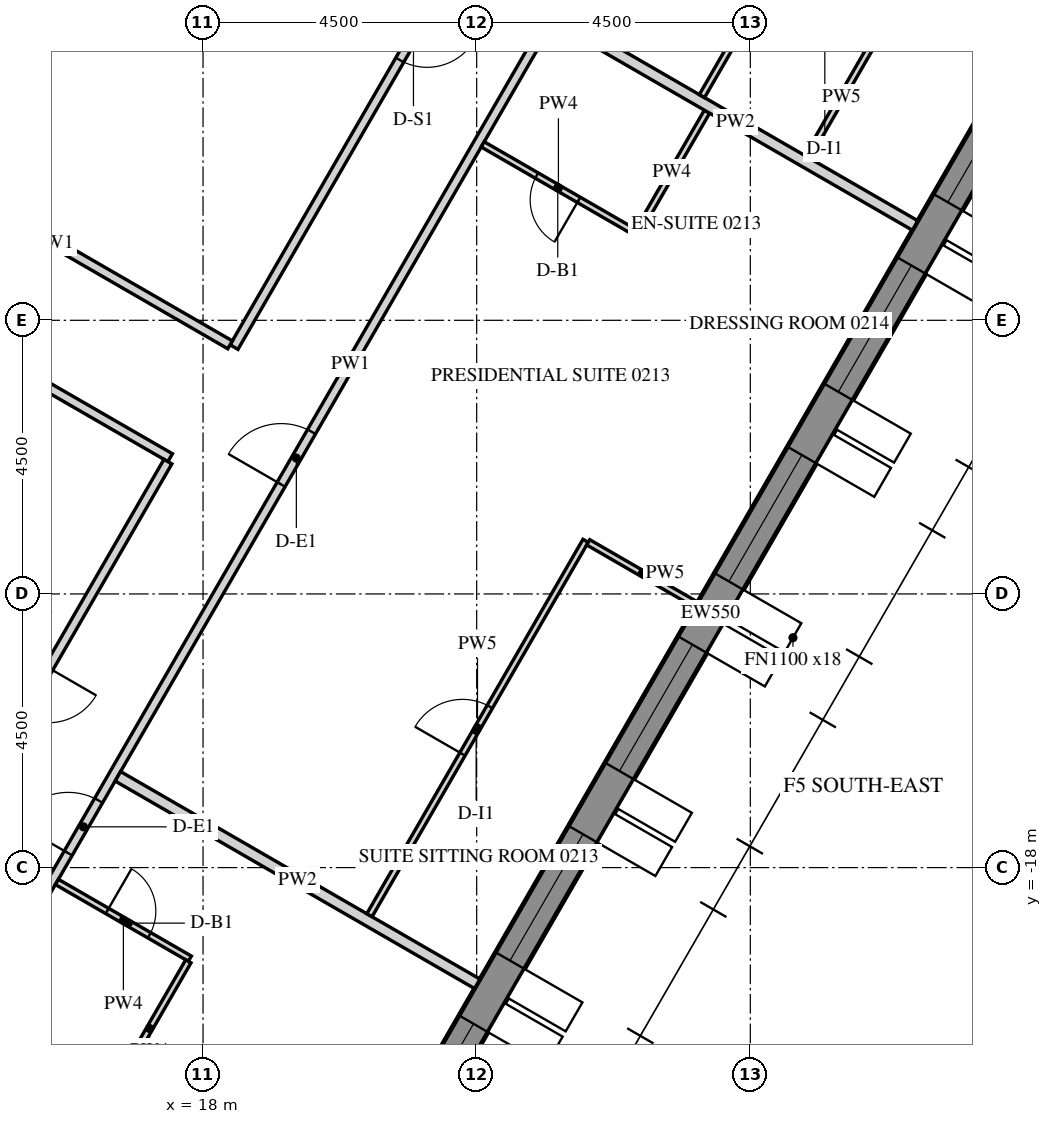
"""IFC4 building model, lengths in metres.
Left out: names, types, materials, properties, quantities, classifications, styles, units other than length and angle.
Written with IfcOpenShell. Run it as: python <this file> out.ifc"""

import sys

from ifc_helpers import new_model, si_unit, direction, frame, frame_2d, origin, place, context, subcontext, project, spatial, polyline, rectangle, outline, extrude, element, fill, save


model = new_model("IFC4")
c1 = context("Model", 3, precision=1e-05, world=origin(), true_north=direction((0.0, 1.0)))
c2 = subcontext(c1, "Body", "Model", "MODEL_VIEW")
j1 = project(units=[si_unit("LENGTHUNIT", "METRE"), si_unit("PLANEANGLEUNIT", "RADIAN")], contexts=[c1])
p1 = place(None, origin())
s1 = spatial("IfcSite", under=j1, at=p1, CompositionType="ELEMENT")
p2 = place(p1, origin())
s2 = spatial("IfcBuilding", under=s1, at=p2, CompositionType="ELEMENT")
p3 = place(p2, frame((0.0, 0.0, 49.2)))
s3 = spatial("IfcBuildingStorey", under=s2, at=p3, CompositionType="ELEMENT", Elevation=49.2)
p4 = place(p3, frame((18.83, -26.835, -0.15), z_axis=(0.0, 0.0, 1.0), x_axis=(0.500003800416, 0.866023209602, 0.0)))
e1 = element("IfcWall", 1, at=p4, inside=s3, PredefinedType="SOLIDWALL", context=c2, shape_type="SweptSolid", body=[
    extrude(outline(polyline([(-0.022, -0.275), (30.097, -0.275), (30.045, 0.275), (0.022, 0.275), (-0.022, -0.275)])), origin(), (0.0, 0.0, 1.0), 3.9),
])
p5 = place(p4, frame((1.236, 0.0, 1.05)))
e2 = element("IfcOpeningElement", 2, at=p5, cuts=e1, PredefinedType="OPENING", context=c2, shape_type="SweptSolid", body=[
    extrude(rectangle(XDim=2.4, YDim=2.4, at=frame_2d((1.2, 1.2))), frame((0.0, 0.285, 0.0), z_axis=(0.0, -1.0, 0.0), x_axis=(1.0, 0.0, 0.0)), (0.0, 0.0, 1.0), 0.57),
])
p6 = place(p4, frame((4.835, 0.0, 1.05)))
e3 = element("IfcOpeningElement", 3, at=p6, cuts=e1, PredefinedType="OPENING", context=c2, shape_type="SweptSolid", body=[
    extrude(rectangle(XDim=2.4, YDim=2.4, at=frame_2d((1.2, 1.2))), frame((0.0, 0.285, 0.0), z_axis=(0.0, -1.0, 0.0), x_axis=(1.0, 0.0, 0.0)), (0.0, 0.0, 1.0), 0.57),
])
p7 = place(p4, frame((8.436, 0.0, 1.05)))
e4 = element("IfcOpeningElement", 4, at=p7, cuts=e1, PredefinedType="OPENING", context=c2, shape_type="SweptSolid", body=[
    extrude(rectangle(XDim=2.4, YDim=2.4, at=frame_2d((1.2, 1.2))), frame((0.0, 0.285, 0.0), z_axis=(0.0, -1.0, 0.0), x_axis=(1.0, 0.0, 0.0)), (0.0, 0.0, 1.0), 0.57),
])
p8 = place(p4, frame((12.035, 0.0, 1.05)))
e5 = element("IfcOpeningElement", 5, at=p8, cuts=e1, PredefinedType="OPENING", context=c2, shape_type="SweptSolid", body=[
    extrude(rectangle(XDim=2.4, YDim=2.4, at=frame_2d((1.2, 1.2))), frame((0.0, 0.285, 0.0), z_axis=(0.0, -1.0, 0.0), x_axis=(1.0, 0.0, 0.0)), (0.0, 0.0, 1.0), 0.57),
])
p9 = place(p4, frame((15.635, 0.0, 1.05)))
e6 = element("IfcOpeningElement", 6, at=p9, cuts=e1, PredefinedType="OPENING", context=c2, shape_type="SweptSolid", body=[
    extrude(rectangle(XDim=2.4, YDim=2.4, at=frame_2d((1.2, 1.2))), frame((0.0, 0.285, 0.0), z_axis=(0.0, -1.0, 0.0), x_axis=(1.0, 0.0, 0.0)), (0.0, 0.0, 1.0), 0.57),
])
p10 = place(p4, frame((19.236, 0.0, 1.05)))
e7 = element("IfcOpeningElement", 7, at=p10, cuts=e1, PredefinedType="OPENING", context=c2, shape_type="SweptSolid", body=[
    extrude(rectangle(XDim=2.4, YDim=2.4, at=frame_2d((1.2, 1.2))), frame((0.0, 0.285, 0.0), z_axis=(0.0, -1.0, 0.0), x_axis=(1.0, 0.0, 0.0)), (0.0, 0.0, 1.0), 0.57),
])
p11 = place(p4, frame((22.835, 0.0, 1.05)))
e8 = element("IfcOpeningElement", 8, at=p11, cuts=e1, PredefinedType="OPENING", context=c2, shape_type="SweptSolid", body=[
    extrude(rectangle(XDim=2.4, YDim=2.4, at=frame_2d((1.2, 1.2))), frame((0.0, 0.285, 0.0), z_axis=(0.0, -1.0, 0.0), x_axis=(1.0, 0.0, 0.0)), (0.0, 0.0, 1.0), 0.57),
])
p12 = place(p4, frame((26.436, 0.0, 1.05)))
e9 = element("IfcOpeningElement", 9, at=p12, cuts=e1, PredefinedType="OPENING", context=c2, shape_type="SweptSolid", body=[
    extrude(rectangle(XDim=2.4, YDim=2.4, at=frame_2d((1.2, 1.2))), frame((0.0, 0.285, 0.0), z_axis=(0.0, -1.0, 0.0), x_axis=(1.0, 0.0, 0.0)), (0.0, 0.0, 1.0), 0.57),
])
p13 = place(p3, frame((7.91, -13.7, -0.15), z_axis=(0.0, 0.0, 1.0), x_axis=(0.499999880136, 0.866025472988, 0.0)))
e10 = element("IfcWall", 10, at=p13, inside=s3, PredefinedType="SHEAR", context=c2, shape_type="SweptSolid", body=[
    extrude(outline(polyline([(-0.173, -0.3), (15.993, -0.3), (15.646, 0.3), (0.173, 0.3), (-0.173, -0.3)])), origin(), (0.0, 0.0, 1.0), 3.9),
])
p14 = place(p13, frame((7.039, 0.0, 0.15)))
e11 = element("IfcOpeningElement", 11, at=p14, cuts=e10, PredefinedType="OPENING", context=c2, shape_type="SweptSolid", body=[
    extrude(rectangle(XDim=1.8, YDim=2.4, at=frame_2d((0.9, 1.2))), frame((0.0, 0.31, 0.0), z_axis=(0.0, -1.0, 0.0), x_axis=(1.0, 0.0, 0.0)), (0.0, 0.0, 1.0), 0.62),
])
p15 = place(p3, frame((8.083, -14.0, -0.15), z_axis=(0.0, 0.0, 1.0), x_axis=(0.499997680643, -0.866026742862, 0.0)))
e12 = element("IfcWall", 12, at=p15, inside=s3, PredefinedType="SHEAR", context=c2, shape_type="SweptSolid", body=[
    extrude(rectangle(XDim=16.509, YDim=0.6, at=frame_2d((8.254, 0.0))), origin(), (0.0, 0.0, 1.0), 3.9),
])
p16 = place(p15, frame((7.354, 0.0, 0.15)))
e13 = element("IfcOpeningElement", 13, at=p16, cuts=e12, PredefinedType="OPENING", context=c2, shape_type="SweptSolid", body=[
    extrude(rectangle(XDim=1.8, YDim=2.4, at=frame_2d((0.9, 1.2))), frame((0.0, 0.31, 0.0), z_axis=(0.0, -1.0, 0.0), x_axis=(1.0, 0.0, 0.0)), (0.0, 0.0, 1.0), 0.62),
])
p17 = place(p3, frame((14.275, -20.375, 0.0), z_axis=(0.0, 0.0, 1.0), x_axis=(0.500001098408, 0.866024769617, 0.0)))
e14 = element("IfcWall", 14, at=p17, inside=s3, PredefinedType="PARTITIONING", context=c2, shape_type="SweptSolid", body=[
    extrude(rectangle(XDim=24.599, YDim=0.15, at=frame_2d((12.299, 0.0))), origin(), (0.0, 0.0, 1.0), 2.988),
])
p18 = place(p17, frame((3.016, 0.0, 0.0)))
e15 = element("IfcOpeningElement", 15, at=p18, cuts=e14, PredefinedType="OPENING", context=c2, shape_type="SweptSolid", body=[
    extrude(rectangle(XDim=1.0, YDim=2.1, at=frame_2d((0.5, 1.05))), frame((0.0, 0.085, 0.0), z_axis=(0.0, -1.0, 0.0), x_axis=(1.0, 0.0, 0.0)), (0.0, 0.0, 1.0), 0.17),
])
p19 = place(p17, frame((10.019, 0.0, 0.0)))
e16 = element("IfcOpeningElement", 16, at=p19, cuts=e14, PredefinedType="OPENING", context=c2, shape_type="SweptSolid", body=[
    extrude(rectangle(XDim=1.0, YDim=2.1, at=frame_2d((0.5, 1.05))), frame((0.0, 0.085, 0.0), z_axis=(0.0, -1.0, 0.0), x_axis=(1.0, 0.0, 0.0)), (0.0, 0.0, 1.0), 0.17),
])
p20 = place(p17, frame((22.459, 0.0, 0.0)))
e17 = element("IfcOpeningElement", 17, at=p20, cuts=e14, PredefinedType="OPENING", context=c2, shape_type="SweptSolid", body=[
    extrude(rectangle(XDim=1.0, YDim=2.1, at=frame_2d((0.5, 1.05))), frame((0.0, 0.085, 0.0), z_axis=(0.0, -1.0, 0.0), x_axis=(1.0, 0.0, 0.0)), (0.0, 0.0, 1.0), 0.17),
])
p21 = place(p3, frame((24.411, 0.782, 0.0), z_axis=(0.0, 0.0, 1.0), x_axis=(-0.499996383721, -0.866027491634, 0.0)))
e18 = element("IfcWall", 18, at=p21, inside=s3, PredefinedType="PARTITIONING", context=c2, shape_type="SweptSolid", body=[
    extrude(rectangle(XDim=11.804, YDim=0.15, at=frame_2d((5.902, 0.0))), origin(), (0.0, 0.0, 1.0), 2.988),
])
p22 = place(p21, frame((5.452, 0.0, 0.0)))
e19 = element("IfcOpeningElement", 19, at=p22, cuts=e18, PredefinedType="OPENING", context=c2, shape_type="SweptSolid", body=[
    extrude(rectangle(XDim=0.9, YDim=2.1, at=frame_2d((0.45, 1.05))), frame((0.0, 0.085, 0.0), z_axis=(0.0, -1.0, 0.0), x_axis=(1.0, 0.0, 0.0)), (0.0, 0.0, 1.0), 0.17),
])
p23 = place(p3, frame((18.445, -9.403, 0.0), z_axis=(0.0, 0.0, 1.0), x_axis=(-0.866033317326, 0.499986293093, 0.0)))
e20 = element("IfcWall", 20, at=p23, inside=s3, PredefinedType="PARTITIONING", context=c2, shape_type="SweptSolid", body=[
    extrude(rectangle(XDim=6.675, YDim=0.15, at=frame_2d((3.337, 0.0))), origin(), (0.0, 0.0, 1.0), 2.988),
])
p24 = place(p3, frame((11.614, -7.884, 0.0), z_axis=(0.0, 0.0, 1.0), x_axis=(0.866026575979, -0.499997969693, 0.0)))
e21 = element("IfcWall", 21, at=p24, inside=s3, PredefinedType="PARTITIONING", context=c2, shape_type="SweptSolid", body=[
    extrude(rectangle(XDim=6.75, YDim=0.15, at=frame_2d((3.375, 0.0))), origin(), (0.0, 0.0, 1.0), 2.988),
])
p25 = place(p3, frame((17.422, -11.324, 0.0), z_axis=(0.0, 0.0, 1.0), x_axis=(-0.499994979726, -0.866028302222, 0.0)))
e22 = element("IfcWall", 22, at=p25, inside=s3, PredefinedType="PARTITIONING", context=c2, shape_type="SweptSolid", body=[
    extrude(rectangle(XDim=8.737, YDim=0.15, at=frame_2d((4.368, 0.0))), origin(), (0.0, 0.0, 1.0), 2.988),
])
p26 = place(p25, frame((3.918, 0.0, 0.0)))
e23 = element("IfcOpeningElement", 23, at=p26, cuts=e22, PredefinedType="OPENING", context=c2, shape_type="SweptSolid", body=[
    extrude(rectangle(XDim=0.9, YDim=2.1, at=frame_2d((0.45, 1.05))), frame((0.0, 0.085, 0.0), z_axis=(0.0, -1.0, 0.0), x_axis=(1.0, 0.0, 0.0)), (0.0, 0.0, 1.0), 0.17),
])
p27 = place(p3, frame((15.597, -18.236, 0.0), z_axis=(0.0, 0.0, 1.0), x_axis=(0.866039067339, -0.499976333282, 0.0)))
e24 = element("IfcWall", 24, at=p27, inside=s3, PredefinedType="PARTITIONING", context=c2, shape_type="SweptSolid", body=[
    extrude(rectangle(XDim=2.525, YDim=0.1, at=frame_2d((1.262, 0.0))), origin(), (0.0, 0.0, 1.0), 2.988),
])
p28 = place(p27, frame((0.955, 0.0, 0.0)))
e25 = element("IfcOpeningElement", 25, at=p28, cuts=e24, PredefinedType="OPENING", context=c2, shape_type="SweptSolid", body=[
    extrude(rectangle(XDim=0.8, YDim=2.1, at=frame_2d((0.4, 1.05))), frame((0.0, 0.06, 0.0), z_axis=(0.0, -1.0, 0.0), x_axis=(1.0, 0.0, 0.0)), (0.0, 0.0, 1.0), 0.12),
])
p29 = place(p3, frame((17.758, -19.542, 0.0), z_axis=(0.0, 0.0, 1.0), x_axis=(-0.499990435942, -0.866030925526, 0.0)))
e26 = element("IfcWall", 26, at=p29, inside=s3, PredefinedType="PARTITIONING", context=c2, shape_type="SweptSolid", body=[
    extrude(rectangle(XDim=2.55, YDim=0.1, at=frame_2d((1.275, 0.0))), origin(), (0.0, 0.0, 1.0), 2.988),
])
p30 = place(p3, frame((16.44, -21.725, 0.0), z_axis=(0.0, 0.0, 1.0), x_axis=(-0.865980596518, 0.500077600433, 0.0)))
e27 = element("IfcWall", 27, at=p30, inside=s3, PredefinedType="PARTITIONING", context=c2, shape_type="SweptSolid", body=[
    extrude(rectangle(XDim=2.4, YDim=0.1, at=frame_2d((1.2, 0.0))), origin(), (0.0, 0.0, 1.0), 2.988),
])
p31 = place(p3, frame((22.51, -19.912, 0.0), z_axis=(0.0, 0.0, 1.0), x_axis=(-0.866019982719, 0.500009389444, 0.0)))
e28 = element("IfcWall", 28, at=p31, inside=s3, PredefinedType="PARTITIONING", context=c2, shape_type="SweptSolid", body=[
    extrude(rectangle(XDim=6.825, YDim=0.18, at=frame_2d((3.413, 0.0))), origin(), (0.0, 0.0, 1.0), 2.988),
])
p32 = place(p3, frame((26.288, -5.569, 0.0), z_axis=(0.0, 0.0, 1.0), x_axis=(-0.500015210774, -0.866016621662, 0.0)))
e29 = element("IfcWall", 29, at=p32, inside=s3, PredefinedType="PARTITIONING", context=c2, shape_type="SweptSolid", body=[
    extrude(rectangle(XDim=2.31, YDim=0.1, at=frame_2d((1.155, 0.0))), origin(), (0.0, 0.0, 1.0), 2.988),
])
p33 = place(p3, frame((25.089, -7.544, 0.0), z_axis=(0.0, 0.0, 1.0), x_axis=(-0.866018712932, 0.500011588718, 0.0)))
e30 = element("IfcWall", 30, at=p33, inside=s3, PredefinedType="PARTITIONING", context=c2, shape_type="SweptSolid", body=[
    extrude(rectangle(XDim=2.875, YDim=0.1, at=frame_2d((1.438, 0.0))), origin(), (0.0, 0.0, 1.0), 2.988),
])
p34 = place(p33, frame((1.05, 0.0, 0.0)))
e31 = element("IfcOpeningElement", 31, at=p34, cuts=e30, PredefinedType="OPENING", context=c2, shape_type="SweptSolid", body=[
    extrude(rectangle(XDim=0.8, YDim=2.1, at=frame_2d((0.4, 1.05))), frame((0.0, 0.06, 0.0), z_axis=(0.0, -1.0, 0.0), x_axis=(1.0, 0.0, 0.0)), (0.0, 0.0, 1.0), 0.12),
])
p35 = place(p3, frame((20.736, -18.784, 0.0), z_axis=(0.0, 0.0, 1.0), x_axis=(0.499990956993, 0.866030624704, 0.0)))
e32 = element("IfcWall", 32, at=p35, inside=s3, PredefinedType="PARTITIONING", context=c2, shape_type="SweptSolid", body=[
    extrude(rectangle(XDim=7.11, YDim=0.1, at=frame_2d((3.555, 0.0))), origin(), (0.0, 0.0, 1.0), 2.988),
])
p36 = place(p35, frame((3.06, 0.0, 0.0)))
e33 = element("IfcOpeningElement", 33, at=p36, cuts=e32, PredefinedType="OPENING", context=c2, shape_type="SweptSolid", body=[
    extrude(rectangle(XDim=0.9, YDim=2.1, at=frame_2d((0.45, 1.05))), frame((0.0, 0.06, 0.0), z_axis=(0.0, -1.0, 0.0), x_axis=(1.0, 0.0, 0.0)), (0.0, 0.0, 1.0), 0.12),
])
p37 = place(p3, frame((24.335, -12.651, 0.0), z_axis=(0.0, 0.0, 1.0), x_axis=(0.865969381856, -0.500097020274, 0.0)))
e34 = element("IfcWall", 34, at=p37, inside=s3, PredefinedType="PARTITIONING", context=c2, shape_type="SweptSolid", body=[
    extrude(rectangle(XDim=2.05, YDim=0.1, at=frame_2d((1.025, 0.0))), origin(), (0.0, 0.0, 1.0), 2.988),
])
p38 = place(p3, frame((29.71, -7.441, 0.0), z_axis=(0.0, 0.0, 1.0), x_axis=(-0.866019982719, 0.500009389444, 0.0)))
e35 = element("IfcWall", 35, at=p38, inside=s3, PredefinedType="PARTITIONING", context=c2, shape_type="SweptSolid", body=[
    extrude(rectangle(XDim=6.825, YDim=0.18, at=frame_2d((3.413, 0.0))), origin(), (0.0, 0.0, 1.0), 2.988),
])
for number, where, z_axis, x_axis in (
    (36, (29.066, -4.356, 0.0), (0.0, 0.0, 1.0), (-0.5, -0.866, 0.0)),
    (37, (26.204, -5.313, 0.0), (0.0, 0.0, 1.0), (0.5, 0.866, 0.0)),
):
    element("IfcWall", number, at=place(p3, frame(where, z_axis=z_axis, x_axis=x_axis)), inside=s3, PredefinedType="PARTITIONING", context=c2, shape_type="SweptSolid", body=[
        extrude(rectangle(XDim=2.26, YDim=0.1, at=frame_2d((1.13, 0.0))), origin(), (0.0, 0.0, 1.0), 2.988),
    ])
p39 = place(p6, frame((0.0, 0.205, 0.0)))
e38 = element("IfcWindow", 38, at=p39, inside=s3, PartitioningType="DOUBLE_PANEL_VERTICAL", PredefinedType="WINDOW", context=c2, shape_type="SweptSolid", body=[
    extrude(rectangle(XDim=2.4, YDim=2.4, at=frame_2d((1.2, 1.2))), frame((0.0, 0.03, 0.0), z_axis=(0.0, -1.0, 0.0), x_axis=(1.0, 0.0, 0.0)), (0.0, 0.0, 1.0), 0.06),
])
fill(e3, e38)
p40 = place(p7, frame((0.0, 0.205, 0.0)))
e39 = element("IfcWindow", 39, at=p40, inside=s3, PartitioningType="DOUBLE_PANEL_VERTICAL", PredefinedType="WINDOW", context=c2, shape_type="SweptSolid", body=[
    extrude(rectangle(XDim=2.4, YDim=2.4, at=frame_2d((1.2, 1.2))), frame((0.0, 0.03, 0.0), z_axis=(0.0, -1.0, 0.0), x_axis=(1.0, 0.0, 0.0)), (0.0, 0.0, 1.0), 0.06),
])
fill(e4, e39)
p41 = place(p8, frame((0.0, 0.205, 0.0)))
e40 = element("IfcWindow", 40, at=p41, inside=s3, PartitioningType="DOUBLE_PANEL_VERTICAL", PredefinedType="WINDOW", context=c2, shape_type="SweptSolid", body=[
    extrude(rectangle(XDim=2.4, YDim=2.4, at=frame_2d((1.2, 1.2))), frame((0.0, 0.03, 0.0), z_axis=(0.0, -1.0, 0.0), x_axis=(1.0, 0.0, 0.0)), (0.0, 0.0, 1.0), 0.06),
])
fill(e5, e40)
p42 = place(p9, frame((0.0, 0.205, 0.0)))
e41 = element("IfcWindow", 41, at=p42, inside=s3, PartitioningType="DOUBLE_PANEL_VERTICAL", PredefinedType="WINDOW", context=c2, shape_type="SweptSolid", body=[
    extrude(rectangle(XDim=2.4, YDim=2.4, at=frame_2d((1.2, 1.2))), frame((0.0, 0.03, 0.0), z_axis=(0.0, -1.0, 0.0), x_axis=(1.0, 0.0, 0.0)), (0.0, 0.0, 1.0), 0.06),
])
fill(e6, e41)
p43 = place(p10, frame((0.0, 0.205, 0.0)))
e42 = element("IfcWindow", 42, at=p43, inside=s3, PartitioningType="DOUBLE_PANEL_VERTICAL", PredefinedType="WINDOW", context=c2, shape_type="SweptSolid", body=[
    extrude(rectangle(XDim=2.4, YDim=2.4, at=frame_2d((1.2, 1.2))), frame((0.0, 0.03, 0.0), z_axis=(0.0, -1.0, 0.0), x_axis=(1.0, 0.0, 0.0)), (0.0, 0.0, 1.0), 0.06),
])
fill(e7, e42)
p44 = place(p11, frame((0.0, 0.205, 0.0)))
e43 = element("IfcWindow", 43, at=p44, inside=s3, PartitioningType="DOUBLE_PANEL_VERTICAL", PredefinedType="WINDOW", context=c2, shape_type="SweptSolid", body=[
    extrude(rectangle(XDim=2.4, YDim=2.4, at=frame_2d((1.2, 1.2))), frame((0.0, 0.03, 0.0), z_axis=(0.0, -1.0, 0.0), x_axis=(1.0, 0.0, 0.0)), (0.0, 0.0, 1.0), 0.06),
])
fill(e8, e43)
p45 = place(p18, origin())
e44 = element("IfcDoor", 44, at=p45, inside=s3, OperationType="SINGLE_SWING_RIGHT", PredefinedType="DOOR", context=c2, shape_type="SweptSolid", body=[
    extrude(rectangle(XDim=1.0, YDim=2.1, at=frame_2d((0.5, 1.05))), frame((0.0, 0.025, 0.0), z_axis=(0.0, -1.0, 0.0), x_axis=(1.0, 0.0, 0.0)), (0.0, 0.0, 1.0), 0.05),
])
fill(e15, e44)
p46 = place(p28, origin())
e45 = element("IfcDoor", 45, at=p46, inside=s3, OperationType="SINGLE_SWING_LEFT", PredefinedType="DOOR", context=c2, shape_type="SweptSolid", body=[
    extrude(rectangle(XDim=0.8, YDim=2.1, at=frame_2d((0.4, 1.05))), frame((0.0, 0.025, 0.0), z_axis=(0.0, -1.0, 0.0), x_axis=(1.0, 0.0, 0.0)), (0.0, 0.0, 1.0), 0.05),
])
fill(e25, e45)
p47 = place(p19, origin())
e46 = element("IfcDoor", 46, at=p47, inside=s3, OperationType="SINGLE_SWING_LEFT", PredefinedType="DOOR", context=c2, shape_type="SweptSolid", body=[
    extrude(rectangle(XDim=1.0, YDim=2.1, at=frame_2d((0.5, 1.05))), frame((0.0, 0.025, 0.0), z_axis=(0.0, -1.0, 0.0), x_axis=(1.0, 0.0, 0.0)), (0.0, 0.0, 1.0), 0.05),
])
fill(e16, e46)
p48 = place(p34, origin())
e47 = element("IfcDoor", 47, at=p48, inside=s3, OperationType="SINGLE_SWING_LEFT", PredefinedType="DOOR", context=c2, shape_type="SweptSolid", body=[
    extrude(rectangle(XDim=0.8, YDim=2.1, at=frame_2d((0.4, 1.05))), frame((0.0, 0.025, 0.0), z_axis=(0.0, -1.0, 0.0), x_axis=(1.0, 0.0, 0.0)), (0.0, 0.0, 1.0), 0.05),
])
fill(e31, e47)
p49 = place(p36, origin())
e48 = element("IfcDoor", 48, at=p49, inside=s3, OperationType="SINGLE_SWING_RIGHT", PredefinedType="DOOR", context=c2, shape_type="SweptSolid", body=[
    extrude(rectangle(XDim=0.9, YDim=2.1, at=frame_2d((0.45, 1.05))), frame((0.0, 0.025, 0.0), z_axis=(0.0, -1.0, 0.0), x_axis=(1.0, 0.0, 0.0)), (0.0, 0.0, 1.0), 0.05),
])
fill(e33, e48)
p50 = place(p22, origin())
e49 = element("IfcDoor", 49, at=p50, inside=s3, OperationType="SINGLE_SWING_RIGHT", PredefinedType="DOOR", context=c2, shape_type="SweptSolid", body=[
    extrude(rectangle(XDim=0.9, YDim=2.1, at=frame_2d((0.45, 1.05))), frame((0.0, 0.025, 0.0), z_axis=(0.0, -1.0, 0.0), x_axis=(1.0, 0.0, 0.0)), (0.0, 0.0, 1.0), 0.05),
])
fill(e19, e49)
save(model, sys.argv[1])
